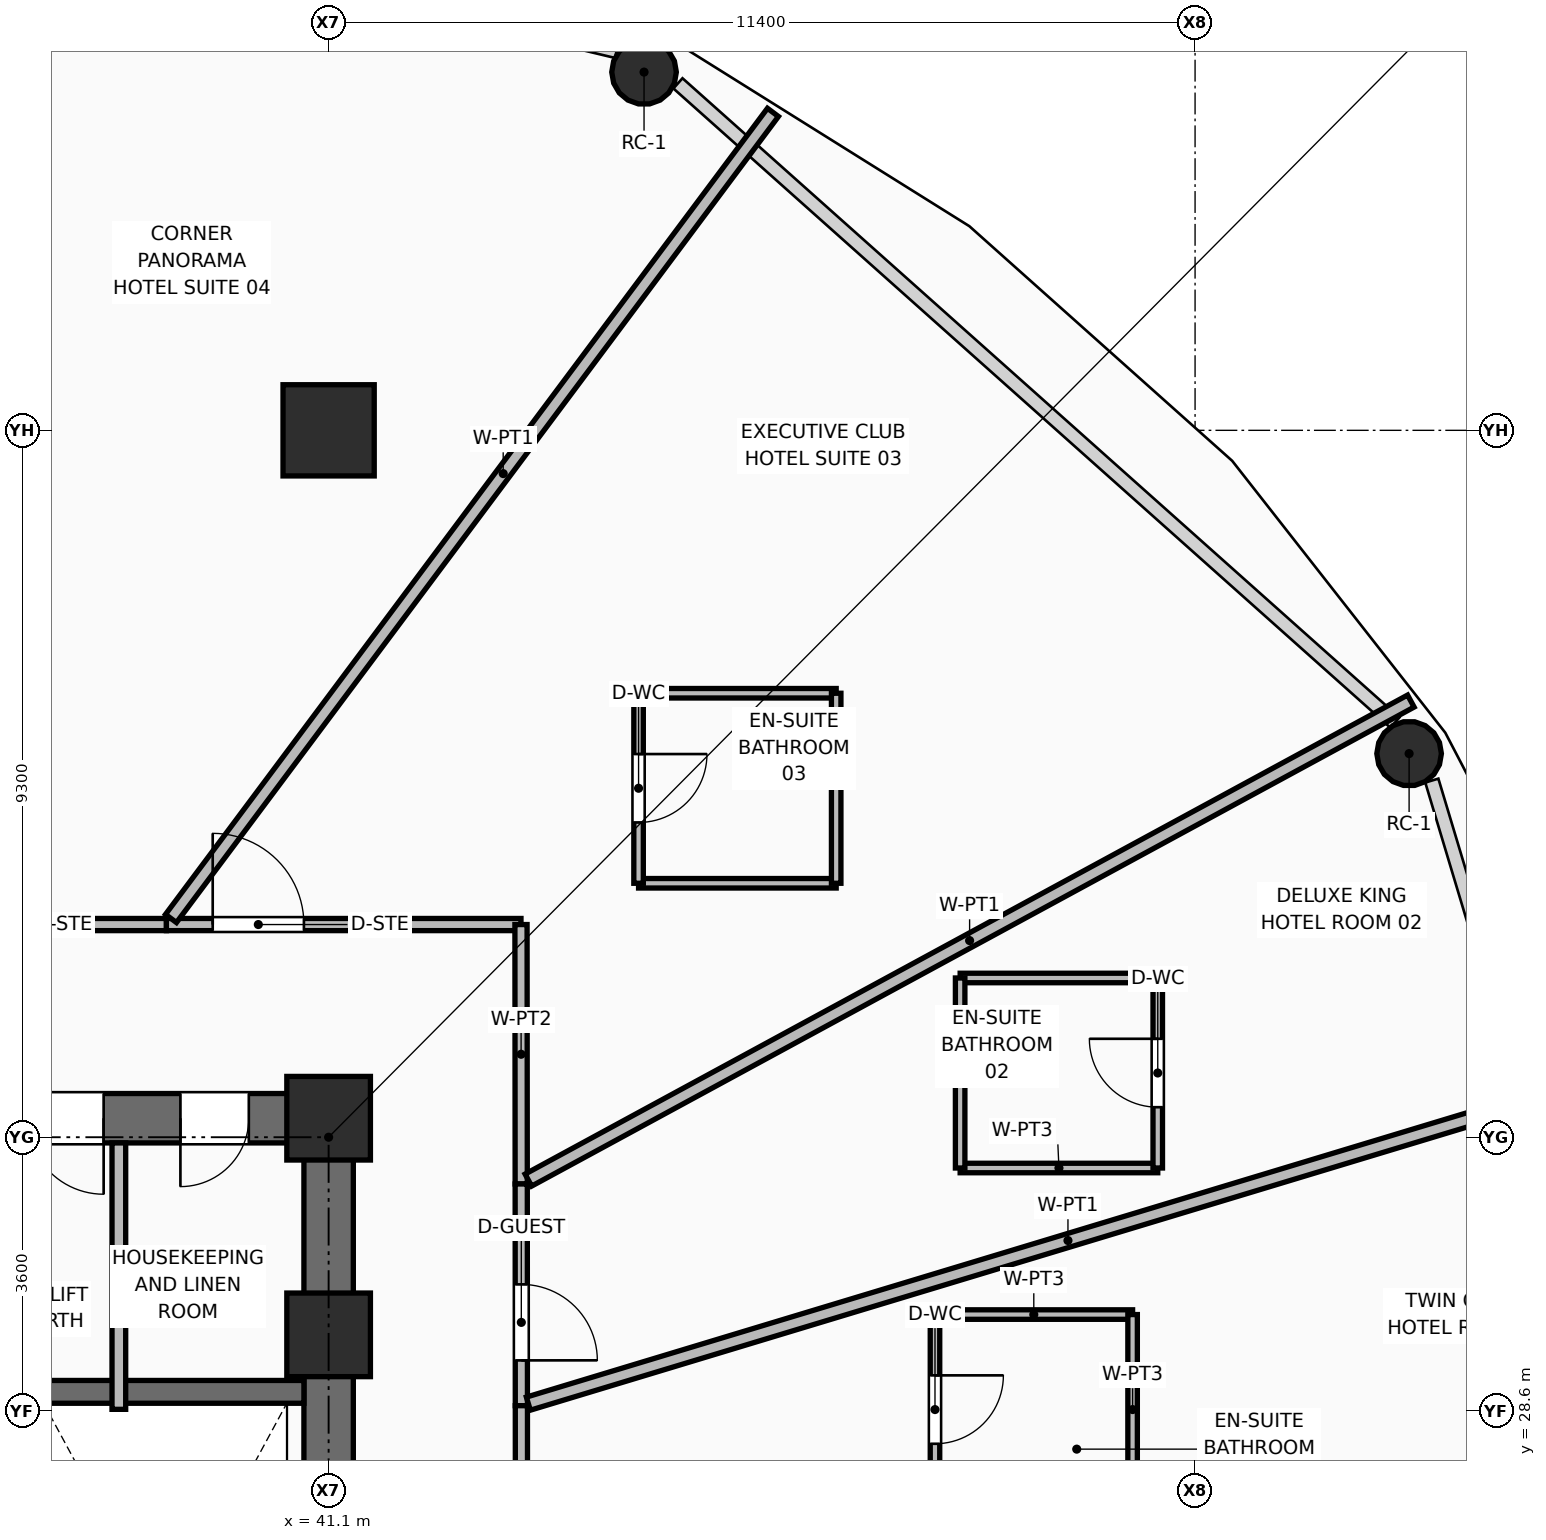
"""IFC4 building model, lengths in metres.
Left out: names, types, materials, properties, quantities, classifications, styles, units other than length and angle.
Written with IfcOpenShell. Run it as: python <this file> out.ifc"""

import sys

from ifc_helpers import new_model, si_unit, direction, frame, frame_2d, origin, origin_2d, place, context, subcontext, project, spatial, rectangle, hollow_rectangle, hollow_circle, extrude, element, fill, save


model = new_model("IFC4")
c1 = context("Model", 3, precision=1e-05, world=origin(), true_north=direction((0.0, 1.0)))
c2 = subcontext(c1, "Body", "Model", "MODEL_VIEW")
j1 = project(units=[si_unit("LENGTHUNIT", "METRE"), si_unit("PLANEANGLEUNIT", "RADIAN")], contexts=[c1])
p1 = place(None, origin())
s1 = spatial("IfcSite", under=j1, at=p1, CompositionType="ELEMENT")
p2 = place(p1, origin())
s2 = spatial("IfcBuilding", under=s1, at=p2, CompositionType="ELEMENT")
p3 = place(p2, frame((0.0, 0.0, 79.5)))
s3 = spatial("IfcBuildingStorey", under=s2, at=p3, CompositionType="ELEMENT", Elevation=79.5)
for number, where, z_axis, x_axis in (
    (1, (41.1, 29.6, 0.0), (0.0, 0.0, 1.0), (1.0, 0.0, 0.0)),
    (2, (41.1, 32.45, 0.0), (0.0, 0.0, 1.0), (1.0, 0.0, 0.0)),
):
    element("IfcColumn", number, at=place(p3, frame(where, z_axis=z_axis, x_axis=x_axis)), inside=s3, PredefinedType="COLUMN", context=c2, shape_type="SweptSolid", body=[
        extrude(rectangle(XDim=1.1, YDim=1.1, at=origin_2d()), origin(), (0.0, 0.0, 1.0), 3.75),
    ])
p4 = place(p3, frame((41.1, 41.5, 0.0), z_axis=(0.0, 0.0, 1.0), x_axis=(1.0, 0.0, 0.0)))
e3 = element("IfcColumn", 3, at=p4, inside=s3, PredefinedType="COLUMN", context=c2, shape_type="SweptSolid", body=[
    extrude(hollow_rectangle(XDim=1.2, YDim=1.2, WallThickness=0.045, at=origin_2d()), origin(), (0.0, 0.0, 1.0), 3.75),
])
for number, where, z_axis, x_axis in (
    (4, (55.316, 37.247, 0.0), (0.0, 0.0, 1.0), (1.0, 0.0, 0.0)),
    (5, (45.25, 46.213, 0.0), (0.0, 0.0, 1.0), (1.0, 0.0, 0.0)),
):
    element("IfcColumn", number, at=place(p3, frame(where, z_axis=z_axis, x_axis=x_axis)), inside=s3, PredefinedType="COLUMN", context=c2, shape_type="SweptSolid", body=[
        extrude(hollow_circle(Radius=0.425, WallThickness=0.04, at=origin_2d()), origin(), (0.0, 0.0, 1.0), 3.57),
    ])
p5 = place(p3, frame((21.575, 32.45, 0.0), z_axis=(0.0, 0.0, 1.0), x_axis=(1.0, 0.0, 0.0)))
e6 = element("IfcWall", 6, at=p5, inside=s3, PredefinedType="SHEAR", context=c2, shape_type="SweptSolid", body=[
    extrude(rectangle(XDim=19.85, YDim=0.65, at=frame_2d((9.925, 0.0))), origin(), (0.0, 0.0, 1.0), 3.57),
])
p6 = place(p5, frame((2.175, 0.0, 0.0)))
e7 = element("IfcOpeningElement", 7, at=p6, cuts=e6, PredefinedType="OPENING", context=c2, shape_type="SweptSolid", body=[
    extrude(rectangle(XDim=1.1, YDim=2.1, at=frame_2d((0.55, 1.05))), frame((0.0, 0.335, 0.0), z_axis=(0.0, -1.0, 0.0), x_axis=(1.0, 0.0, 0.0)), (0.0, 0.0, 1.0), 0.67),
])
p7 = place(p5, frame((15.565, 0.0, 0.0)))
e8 = element("IfcOpeningElement", 8, at=p7, cuts=e6, PredefinedType="OPENING", context=c2, shape_type="SweptSolid", body=[
    extrude(rectangle(XDim=1.0, YDim=2.1, at=frame_2d((0.5, 1.05))), frame((0.0, 0.335, 0.0), z_axis=(0.0, -1.0, 0.0), x_axis=(1.0, 0.0, 0.0)), (0.0, 0.0, 1.0), 0.67),
])
p8 = place(p5, frame((17.575, 0.0, 0.0)))
e9 = element("IfcOpeningElement", 9, at=p8, cuts=e6, PredefinedType="OPENING", context=c2, shape_type="SweptSolid", body=[
    extrude(rectangle(XDim=0.9, YDim=2.1, at=frame_2d((0.45, 1.05))), frame((0.0, 0.335, 0.0), z_axis=(0.0, -1.0, 0.0), x_axis=(1.0, 0.0, 0.0)), (0.0, 0.0, 1.0), 0.67),
])
p9 = place(p3, frame((41.1, 18.125, 0.0), z_axis=(0.0, 0.0, 1.0), x_axis=(0.0, 1.0, 0.0)))
e10 = element("IfcWall", 10, at=p9, inside=s3, PredefinedType="SHEAR", context=c2, shape_type="SweptSolid", body=[
    extrude(rectangle(XDim=14.0, YDim=0.65, at=frame_2d((7.0, 0.0))), origin(), (0.0, 0.0, 1.0), 3.57),
])
p10 = place(p9, frame((3.335, 0.0, 0.0)))
e11 = element("IfcOpeningElement", 11, at=p10, cuts=e10, PredefinedType="OPENING", context=c2, shape_type="SweptSolid", body=[
    extrude(rectangle(XDim=1.05, YDim=2.1, at=frame_2d((0.525, 1.05))), frame((0.0, 0.335, 0.0), z_axis=(0.0, -1.0, 0.0), x_axis=(1.0, 0.0, 0.0)), (0.0, 0.0, 1.0), 0.67),
])
p11 = place(p3, frame((37.21, 28.85, 0.0), z_axis=(0.0, 0.0, 1.0), x_axis=(1.0, 0.0, 0.0)))
e12 = element("IfcWall", 12, at=p11, inside=s3, PredefinedType="SHEAR", context=c2, shape_type="SweptSolid", body=[
    extrude(rectangle(XDim=3.565, YDim=0.3, at=frame_2d((1.782, 0.0))), origin(), (0.0, 0.0, 1.0), 3.57),
])
p12 = place(p3, frame((38.34, 28.62, 0.0), z_axis=(0.0, 0.0, 1.0), x_axis=(0.0, 1.0, 0.0)))
e13 = element("IfcWall", 13, at=p12, inside=s3, PredefinedType="PARTITIONING", context=c2, shape_type="SweptSolid", body=[
    extrude(rectangle(XDim=3.505, YDim=0.18, at=frame_2d((1.752, 0.0))), origin(), (0.0, 0.0, 1.0), 3.55),
])
p13 = place(p3, frame((33.056, 34.998, 0.0), z_axis=(0.0, 0.0, 1.0), x_axis=(1.0, 0.0, 0.0)))
e14 = element("IfcWall", 14, at=p13, inside=s3, PredefinedType="PARTITIONING", context=c2, shape_type="SweptSolid", body=[
    extrude(rectangle(XDim=5.91, YDim=0.16, at=frame_2d((2.955, 0.0))), origin(), (0.0, 0.0, 1.0), 3.55),
])
p14 = place(p13, frame((2.355, 0.0, 0.0)))
e15 = element("IfcOpeningElement", 15, at=p14, cuts=e14, PredefinedType="OPENING", context=c2, shape_type="SweptSolid", body=[
    extrude(rectangle(XDim=1.2, YDim=2.1, at=frame_2d((0.6, 1.05))), frame((0.0, 0.09, 0.0), z_axis=(0.0, -1.0, 0.0), x_axis=(1.0, 0.0, 0.0)), (0.0, 0.0, 1.0), 0.18),
])
p15 = place(p3, frame((38.966, 34.998, 0.0), z_axis=(0.0, 0.0, 1.0), x_axis=(1.0, 0.0, 0.0)))
e16 = element("IfcWall", 16, at=p15, inside=s3, PredefinedType="PARTITIONING", context=c2, shape_type="SweptSolid", body=[
    extrude(rectangle(XDim=4.665, YDim=0.16, at=frame_2d((2.333, 0.0))), origin(), (0.0, 0.0, 1.0), 2.928),
])
p16 = place(p15, frame((0.609, 0.0, 0.0)))
e17 = element("IfcOpeningElement", 17, at=p16, cuts=e16, PredefinedType="OPENING", context=c2, shape_type="SweptSolid", body=[
    extrude(rectangle(XDim=1.2, YDim=2.1, at=frame_2d((0.6, 1.05))), frame((0.0, 0.09, 0.0), z_axis=(0.0, -1.0, 0.0), x_axis=(1.0, 0.0, 0.0)), (0.0, 0.0, 1.0), 0.18),
])
p17 = place(p3, frame((43.631, 34.998, 0.0), z_axis=(0.0, 0.0, 1.0), x_axis=(0.000858368782, -0.999999631601, 0.0)))
e18 = element("IfcWall", 18, at=p17, inside=s3, PredefinedType="PARTITIONING", context=c2, shape_type="SweptSolid", body=[
    extrude(rectangle(XDim=3.413, YDim=0.16, at=frame_2d((1.707, 0.0))), origin(), (0.0, 0.0, 1.0), 2.928),
])
p18 = place(p3, frame((43.634, 31.585, 0.0), z_axis=(0.0, 0.0, 1.0), x_axis=(0.000669567978, -0.999999775839, 0.0)))
e19 = element("IfcWall", 19, at=p18, inside=s3, PredefinedType="PARTITIONING", context=c2, shape_type="SweptSolid", body=[
    extrude(rectangle(XDim=2.917, YDim=0.16, at=frame_2d((1.458, 0.0))), origin(), (0.0, 0.0, 1.0), 3.55),
])
p19 = place(p18, frame((1.321, 0.0, 0.0)))
e20 = element("IfcOpeningElement", 20, at=p19, cuts=e19, PredefinedType="OPENING", context=c2, shape_type="SweptSolid", body=[
    extrude(rectangle(XDim=1.0, YDim=2.1, at=frame_2d((0.5, 1.05))), frame((0.0, 0.09, 0.0), z_axis=(0.0, -1.0, 0.0), x_axis=(1.0, 0.0, 0.0)), (0.0, 0.0, 1.0), 0.18),
])
p20 = place(p3, frame((43.636, 28.668, 0.0), z_axis=(0.0, 0.0, 1.0), x_axis=(0.00077632194, -0.999999698662, 0.0)))
e21 = element("IfcWall", 21, at=p20, inside=s3, PredefinedType="PARTITIONING", context=c2, shape_type="SweptSolid", body=[
    extrude(rectangle(XDim=2.516, YDim=0.16, at=frame_2d((1.258, 0.0))), origin(), (0.0, 0.0, 1.0), 3.55),
])
p21 = place(p20, frame((0.758, 0.0, 0.0)))
e22 = element("IfcOpeningElement", 22, at=p21, cuts=e21, PredefinedType="OPENING", context=c2, shape_type="SweptSolid", body=[
    extrude(rectangle(XDim=1.0, YDim=2.1, at=frame_2d((0.5, 1.05))), frame((0.0, 0.09, 0.0), z_axis=(0.0, -1.0, 0.0), x_axis=(1.0, 0.0, 0.0)), (0.0, 0.0, 1.0), 0.18),
])
p22 = place(p3, frame((43.728, 28.695, 0.0), z_axis=(0.0, 0.0, 1.0), x_axis=(0.957224891777, 0.289344961183, 0.0)))
e23 = element("IfcWall", 23, at=p22, inside=s3, PredefinedType="PARTITIONING", context=c2, shape_type="SweptSolid", body=[
    extrude(rectangle(XDim=14.833, YDim=0.18, at=frame_2d((7.417, 0.0))), origin(), (0.0, 0.0, 1.0), 2.775),
])
p23 = place(p3, frame((43.728, 31.636, 0.0), z_axis=(0.0, 0.0, 1.0), x_axis=(0.878890179317, 0.477024163643, 0.0)))
e24 = element("IfcWall", 24, at=p23, inside=s3, PredefinedType="PARTITIONING", context=c2, shape_type="SweptSolid", body=[
    extrude(rectangle(XDim=13.211, YDim=0.18, at=frame_2d((6.605, 0.0))), origin(), (0.0, 0.0, 1.0), 2.775),
])
p24 = place(p3, frame((39.026, 35.078, 0.0), z_axis=(0.0, 0.0, 1.0), x_axis=(0.598366758348, 0.801222330258, 0.0)))
e25 = element("IfcWall", 25, at=p24, inside=s3, PredefinedType="PARTITIONING", context=c2, shape_type="SweptSolid", body=[
    extrude(rectangle(XDim=13.236, YDim=0.18, at=frame_2d((6.618, 0.0))), origin(), (0.0, 0.0, 1.0), 2.775),
])
p25 = place(p3, frame((49.078, 29.867, 0.0), z_axis=(0.0, 0.0, 1.0), x_axis=(1.0, 0.0, 0.0)))
e26 = element("IfcWall", 26, at=p25, inside=s3, PredefinedType="PARTITIONING", context=c2, shape_type="SweptSolid", body=[
    extrude(rectangle(XDim=2.6, YDim=0.125, at=frame_2d((1.3, 0.0))), origin(), (0.0, 0.0, 1.0), 3.55),
])
p26 = place(p3, frame((49.078, 27.367, 0.0), z_axis=(0.0, 0.0, 1.0), x_axis=(0.0, 1.0, 0.0)))
e27 = element("IfcWall", 27, at=p26, inside=s3, PredefinedType="PARTITIONING", context=c2, shape_type="SweptSolid", body=[
    extrude(rectangle(XDim=2.5, YDim=0.125, at=frame_2d((1.25, 0.0))), origin(), (0.0, 0.0, 1.0), 3.55),
])
p27 = place(p26, frame((0.8, 0.0, 0.0)))
e28 = element("IfcOpeningElement", 28, at=p27, cuts=e27, PredefinedType="OPENING", context=c2, shape_type="SweptSolid", body=[
    extrude(rectangle(XDim=0.9, YDim=2.1, at=frame_2d((0.45, 1.05))), frame((0.0, 0.073, 0.0), z_axis=(0.0, -1.0, 0.0), x_axis=(1.0, 0.0, 0.0)), (0.0, 0.0, 1.0), 0.145),
])
p28 = place(p3, frame((51.678, 27.367, 0.0), z_axis=(0.0, 0.0, 1.0), x_axis=(0.0, 1.0, 0.0)))
e29 = element("IfcWall", 29, at=p28, inside=s3, PredefinedType="PARTITIONING", context=c2, shape_type="SweptSolid", body=[
    extrude(rectangle(XDim=2.5, YDim=0.125, at=frame_2d((1.25, 0.0))), origin(), (0.0, 0.0, 1.0), 3.55),
])
for number, where, z_axis, x_axis in (
    (30, (49.409, 31.795, 0.0), (0.0, 0.0, 1.0), (1.0, 0.0, 0.0)),
    (31, (49.409, 34.295, 0.0), (0.0, 0.0, 1.0), (1.0, 0.0, 0.0)),
):
    element("IfcWall", number, at=place(p3, frame(where, z_axis=z_axis, x_axis=x_axis)), inside=s3, PredefinedType="PARTITIONING", context=c2, shape_type="SweptSolid", body=[
        extrude(rectangle(XDim=2.6, YDim=0.125, at=frame_2d((1.3, 0.0))), origin(), (0.0, 0.0, 1.0), 3.55),
    ])
p29 = place(p3, frame((49.409, 31.795, 0.0), z_axis=(0.0, 0.0, 1.0), x_axis=(0.0, 1.0, 0.0)))
e32 = element("IfcWall", 32, at=p29, inside=s3, PredefinedType="PARTITIONING", context=c2, shape_type="SweptSolid", body=[
    extrude(rectangle(XDim=2.5, YDim=0.125, at=frame_2d((1.25, 0.0))), origin(), (0.0, 0.0, 1.0), 3.55),
])
p30 = place(p3, frame((52.009, 31.795, 0.0), z_axis=(0.0, 0.0, 1.0), x_axis=(0.0, 1.0, 0.0)))
e33 = element("IfcWall", 33, at=p30, inside=s3, PredefinedType="PARTITIONING", context=c2, shape_type="SweptSolid", body=[
    extrude(rectangle(XDim=2.5, YDim=0.125, at=frame_2d((1.25, 0.0))), origin(), (0.0, 0.0, 1.0), 3.55),
])
p31 = place(p30, frame((0.8, 0.0, 0.0)))
e34 = element("IfcOpeningElement", 34, at=p31, cuts=e33, PredefinedType="OPENING", context=c2, shape_type="SweptSolid", body=[
    extrude(rectangle(XDim=0.9, YDim=2.1, at=frame_2d((0.45, 1.05))), frame((0.0, 0.073, 0.0), z_axis=(0.0, -1.0, 0.0), x_axis=(1.0, 0.0, 0.0)), (0.0, 0.0, 1.0), 0.145),
])
for number, where, z_axis, x_axis in (
    (35, (45.178, 35.541, 0.0), (0.0, 0.0, 1.0), (1.0, 0.0, 0.0)),
    (36, (45.178, 38.041, 0.0), (0.0, 0.0, 1.0), (1.0, 0.0, 0.0)),
):
    element("IfcWall", number, at=place(p3, frame(where, z_axis=z_axis, x_axis=x_axis)), inside=s3, PredefinedType="PARTITIONING", context=c2, shape_type="SweptSolid", body=[
        extrude(rectangle(XDim=2.6, YDim=0.125, at=frame_2d((1.3, 0.0))), origin(), (0.0, 0.0, 1.0), 3.55),
    ])
p32 = place(p3, frame((45.178, 35.541, 0.0), z_axis=(0.0, 0.0, 1.0), x_axis=(0.0, 1.0, 0.0)))
e37 = element("IfcWall", 37, at=p32, inside=s3, PredefinedType="PARTITIONING", context=c2, shape_type="SweptSolid", body=[
    extrude(rectangle(XDim=2.5, YDim=0.125, at=frame_2d((1.25, 0.0))), origin(), (0.0, 0.0, 1.0), 3.55),
])
p33 = place(p32, frame((0.8, 0.0, 0.0)))
e38 = element("IfcOpeningElement", 38, at=p33, cuts=e37, PredefinedType="OPENING", context=c2, shape_type="SweptSolid", body=[
    extrude(rectangle(XDim=0.9, YDim=2.1, at=frame_2d((0.45, 1.05))), frame((0.0, 0.073, 0.0), z_axis=(0.0, -1.0, 0.0), x_axis=(1.0, 0.0, 0.0)), (0.0, 0.0, 1.0), 0.145),
])
p34 = place(p3, frame((47.778, 35.541, 0.0), z_axis=(0.0, 0.0, 1.0), x_axis=(0.0, 1.0, 0.0)))
e39 = element("IfcWall", 39, at=p34, inside=s3, PredefinedType="PARTITIONING", context=c2, shape_type="SweptSolid", body=[
    extrude(rectangle(XDim=2.5, YDim=0.125, at=frame_2d((1.25, 0.0))), origin(), (0.0, 0.0, 1.0), 3.55),
])
p35 = place(p7, frame((1.0, 0.0, 0.0), z_axis=(0.0, 0.0, 1.0), x_axis=(-1.0, 0.0, 0.0)))
e40 = element("IfcDoor", 40, at=p35, inside=s3, OperationType="SINGLE_SWING_LEFT", PredefinedType="DOOR", context=c2, shape_type="SweptSolid", body=[
    extrude(rectangle(XDim=1.0, YDim=2.1, at=frame_2d((0.5, 1.05))), frame((0.0, 0.025, 0.0), z_axis=(0.0, -1.0, 0.0), x_axis=(1.0, 0.0, 0.0)), (0.0, 0.0, 1.0), 0.05),
])
fill(e8, e40)
p36 = place(p8, frame((0.9, 0.0, 0.0), z_axis=(0.0, 0.0, 1.0), x_axis=(-1.0, 0.0, 0.0)))
e41 = element("IfcDoor", 41, at=p36, inside=s3, OperationType="SINGLE_SWING_RIGHT", PredefinedType="DOOR", context=c2, shape_type="SweptSolid", body=[
    extrude(rectangle(XDim=0.9, YDim=2.1, at=frame_2d((0.45, 1.05))), frame((0.0, 0.025, 0.0), z_axis=(0.0, -1.0, 0.0), x_axis=(1.0, 0.0, 0.0)), (0.0, 0.0, 1.0), 0.05),
])
fill(e9, e41)
p37 = place(p27, frame((0.9, 0.0, 0.0), z_axis=(0.0, 0.0, 1.0), x_axis=(-1.0, 0.0, 0.0)))
e42 = element("IfcDoor", 42, at=p37, inside=s3, OperationType="SINGLE_SWING_LEFT", PredefinedType="DOOR", context=c2, shape_type="SweptSolid", body=[
    extrude(rectangle(XDim=0.9, YDim=2.1, at=frame_2d((0.45, 1.05))), frame((0.0, 0.025, 0.0), z_axis=(0.0, -1.0, 0.0), x_axis=(1.0, 0.0, 0.0)), (0.0, 0.0, 1.0), 0.05),
])
fill(e28, e42)
p38 = place(p31, origin())
e43 = element("IfcDoor", 43, at=p38, inside=s3, OperationType="SINGLE_SWING_RIGHT", PredefinedType="DOOR", context=c2, shape_type="SweptSolid", body=[
    extrude(rectangle(XDim=0.9, YDim=2.1, at=frame_2d((0.45, 1.05))), frame((0.0, 0.025, 0.0), z_axis=(0.0, -1.0, 0.0), x_axis=(1.0, 0.0, 0.0)), (0.0, 0.0, 1.0), 0.05),
])
fill(e34, e43)
p39 = place(p19, origin())
e44 = element("IfcDoor", 44, at=p39, inside=s3, OperationType="SINGLE_SWING_RIGHT", PredefinedType="DOOR", context=c2, shape_type="SweptSolid", body=[
    extrude(rectangle(XDim=1.0, YDim=2.1, at=frame_2d((0.5, 1.05))), frame((0.0, 0.025, 0.0), z_axis=(0.0, -1.0, 0.0), x_axis=(1.0, 0.0, 0.0)), (0.0, 0.0, 1.0), 0.05),
])
fill(e20, e44)
p40 = place(p33, frame((0.9, 0.0, 0.0), z_axis=(0.0, 0.0, 1.0), x_axis=(-1.0, 0.0, 0.0)))
e45 = element("IfcDoor", 45, at=p40, inside=s3, OperationType="SINGLE_SWING_LEFT", PredefinedType="DOOR", context=c2, shape_type="SweptSolid", body=[
    extrude(rectangle(XDim=0.9, YDim=2.1, at=frame_2d((0.45, 1.05))), frame((0.0, 0.025, 0.0), z_axis=(0.0, -1.0, 0.0), x_axis=(1.0, 0.0, 0.0)), (0.0, 0.0, 1.0), 0.05),
])
fill(e38, e45)
p41 = place(p16, origin())
e46 = element("IfcDoor", 46, at=p41, inside=s3, OperationType="SINGLE_SWING_LEFT", PredefinedType="DOOR", context=c2, shape_type="SweptSolid", body=[
    extrude(rectangle(XDim=1.2, YDim=2.1, at=frame_2d((0.6, 1.05))), frame((0.0, 0.025, 0.0), z_axis=(0.0, -1.0, 0.0), x_axis=(1.0, 0.0, 0.0)), (0.0, 0.0, 1.0), 0.05),
])
fill(e17, e46)
save(model, sys.argv[1])
